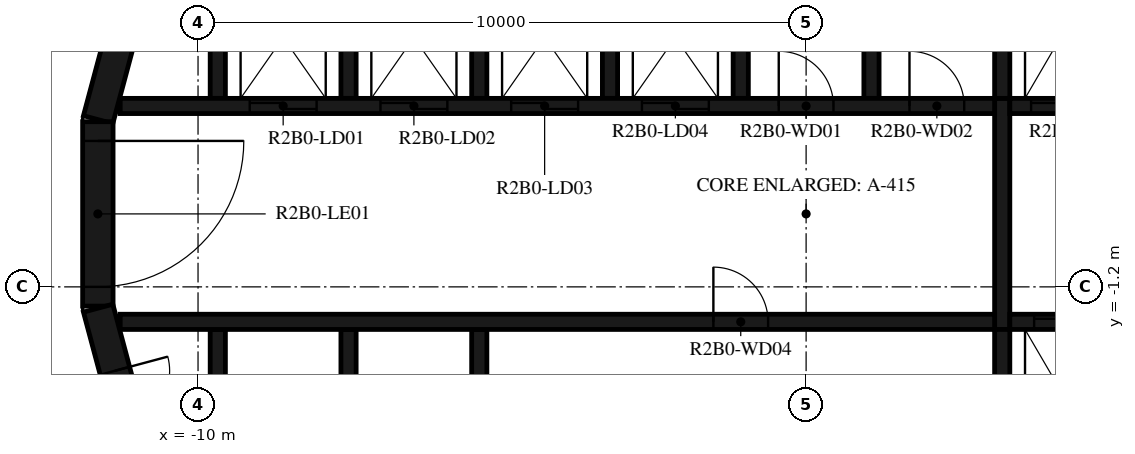
"""IFC4 building model, lengths in metres.
Left out: names, types, materials, properties, quantities, classifications, styles, units other than length and angle.
Written with IfcOpenShell. Run it as: python <this file> out.ifc"""

import sys

from ifc_helpers import new_model, si_unit, direction, frame, frame_2d, origin, place, context, subcontext, project, spatial, polyline, rectangle, outline, extrude, element, fill, save


model = new_model("IFC4")
c1 = context("Model", 3, precision=1e-05, world=origin(), true_north=direction((0.0, 1.0)))
c2 = subcontext(c1, "Body", "Model", "MODEL_VIEW")
j1 = project(units=[si_unit("LENGTHUNIT", "METRE"), si_unit("PLANEANGLEUNIT", "RADIAN")], contexts=[c1])
p1 = place(None, origin())
s1 = spatial("IfcSite", under=j1, at=p1, CompositionType="ELEMENT")
p2 = place(p1, origin())
s2 = spatial("IfcBuilding", under=s1, at=p2, CompositionType="ELEMENT")
p3 = place(p2, frame((0.0, 0.0, 90.7)))
s3 = spatial("IfcBuildingStorey", under=s2, at=p3, CompositionType="ELEMENT", Elevation=90.7)
p4 = place(p3, frame((-10.858, 4.479, 0.0), z_axis=(0.0, 0.0, 1.0), x_axis=(-0.258734743916, -0.965948410781, 0.0)))
e1 = element("IfcWall", 1, at=p4, inside=s3, PredefinedType="SHEAR", context=c2, shape_type="SweptSolid", body=[
    extrude(rectangle(XDim=3.033, YDim=0.5, at=frame_2d((1.516, 0.0))), origin(), (0.0, 0.0, 1.0), 3.12),
])
p5 = place(p3, frame((-11.647, 1.516, 0.0), z_axis=(0.0, 0.0, 1.0), x_axis=(0.0, -1.0, 0.0)))
e2 = element("IfcWall", 2, at=p5, inside=s3, PredefinedType="SHEAR", context=c2, shape_type="SweptSolid", body=[
    extrude(rectangle(XDim=3.033, YDim=0.5, at=frame_2d((1.516, 0.0))), origin(), (0.0, 0.0, 1.0), 3.12),
])
p6 = place(p5, frame((0.316, 0.0, 0.0)))
e3 = element("IfcOpeningElement", 3, at=p6, cuts=e2, PredefinedType="OPENING", context=c2, shape_type="SweptSolid", body=[
    extrude(rectangle(XDim=2.4, YDim=2.1, at=frame_2d((1.2, 1.05))), frame((0.0, 0.26, 0.0), z_axis=(0.0, -1.0, 0.0), x_axis=(1.0, 0.0, 0.0)), (0.0, 0.0, 1.0), 0.52),
])
p7 = place(p3, frame((-11.643, -1.55, 0.0), z_axis=(0.0, 0.0, 1.0), x_axis=(0.258734743916, -0.965948410781, 0.0)))
e4 = element("IfcWall", 4, at=p7, inside=s3, PredefinedType="SHEAR", context=c2, shape_type="SweptSolid", body=[
    extrude(rectangle(XDim=3.033, YDim=0.5, at=frame_2d((1.516, 0.0))), origin(), (0.0, 0.0, 1.0), 3.12),
])
p8 = place(p7, frame((1.066, 0.0, 0.0)))
e5 = element("IfcOpeningElement", 5, at=p8, cuts=e4, PredefinedType="OPENING", context=c2, shape_type="SweptSolid", body=[
    extrude(rectangle(XDim=0.9, YDim=2.1, at=frame_2d((0.45, 1.05))), frame((0.0, 0.26, 0.0), z_axis=(0.0, -1.0, 0.0), x_axis=(1.0, 0.0, 0.0)), (0.0, 0.0, 1.0), 0.52),
])
p9 = place(p3, origin())
e6 = element("IfcWall", 6, at=p9, inside=s3, PredefinedType="SHEAR", context=c2, shape_type="SweptSolid", body=[
    extrude(outline(polyline([(-9.55, 4.8), (-7.65, 4.8), (-7.65, 1.9), (-7.4, 1.9), (-7.4, 4.8), (-5.5, 4.8), (-5.5, 1.9), (-5.25, 1.9), (-5.25, 4.8), (-3.35, 4.8), (-3.35, 1.9), (-3.1, 1.9), (-3.1, 4.8), (-1.2, 4.8), (-1.2, 1.9), (-0.95, 1.9), (-0.95, 4.8), (0.95, 4.8), (0.95, 1.9), (1.2, 1.9), (1.2, 4.8), (3.1, 4.8), (3.1, 1.9), (3.35, 1.9), (3.35, 4.8), (5.25, 4.8), (5.25, 1.9), (5.5, 1.9), (5.5, 4.8), (7.4, 4.8), (7.4, 1.9), (7.65, 1.9), (7.65, 4.8), (9.55, 4.8), (9.55, 1.9), (9.8, 1.9), (9.8, 4.8), (9.8, 5.05), (-9.8, 5.05), (-9.8, 4.8), (-9.8, 1.9), (-9.55, 1.9), (-9.55, 4.8)])), origin(), (0.0, 0.0, 1.0), 3.12),
])
p10 = place(p3, origin())
e7 = element("IfcWall", 7, at=p10, inside=s3, PredefinedType="SHEAR", context=c2, shape_type="SweptSolid", body=[
    extrude(outline(polyline([(9.8, -5.05), (9.8, -4.8), (9.8, -1.9), (9.55, -1.9), (9.55, -4.8), (7.65, -4.8), (7.65, -1.9), (7.4, -1.9), (7.4, -4.8), (5.5, -4.8), (5.5, -1.9), (5.25, -1.9), (5.25, -4.8), (3.35, -4.8), (3.35, -1.9), (3.1, -1.9), (3.1, -4.8), (-5.25, -4.8), (-5.25, -1.9), (-5.5, -1.9), (-5.5, -4.8), (-7.4, -4.8), (-7.4, -1.9), (-7.65, -1.9), (-7.65, -4.8), (-9.55, -4.8), (-9.55, -1.9), (-9.8, -1.9), (-9.8, -4.8), (-9.8, -5.05), (9.8, -5.05)])), origin(), (0.0, 0.0, 1.0), 3.12),
])
p11 = place(p3, frame((-11.28, 1.775, 0.0), z_axis=(0.0, 0.0, 1.0), x_axis=(1.0, 0.0, 0.0)))
e8 = element("IfcWall", 8, at=p11, inside=s3, PredefinedType="SHEAR", context=c2, shape_type="SweptSolid", body=[
    extrude(rectangle(XDim=14.38, YDim=0.25, at=frame_2d((7.19, 0.0))), origin(), (0.0, 0.0, 1.0), 3.12),
])
p12 = place(p11, frame((2.13, 0.0, 0.0)))
e9 = element("IfcOpeningElement", 9, at=p12, cuts=e8, PredefinedType="OPENING", context=c2, shape_type="SweptSolid", body=[
    extrude(rectangle(XDim=1.1, YDim=2.1, at=frame_2d((0.55, 1.05))), frame((0.0, 0.135, 0.0), z_axis=(0.0, -1.0, 0.0), x_axis=(1.0, 0.0, 0.0)), (0.0, 0.0, 1.0), 0.27),
])
p13 = place(p11, frame((4.28, 0.0, 0.0)))
e10 = element("IfcOpeningElement", 10, at=p13, cuts=e8, PredefinedType="OPENING", context=c2, shape_type="SweptSolid", body=[
    extrude(rectangle(XDim=1.1, YDim=2.1, at=frame_2d((0.55, 1.05))), frame((0.0, 0.135, 0.0), z_axis=(0.0, -1.0, 0.0), x_axis=(1.0, 0.0, 0.0)), (0.0, 0.0, 1.0), 0.27),
])
p14 = place(p11, frame((6.43, 0.0, 0.0)))
e11 = element("IfcOpeningElement", 11, at=p14, cuts=e8, PredefinedType="OPENING", context=c2, shape_type="SweptSolid", body=[
    extrude(rectangle(XDim=1.1, YDim=2.1, at=frame_2d((0.55, 1.05))), frame((0.0, 0.135, 0.0), z_axis=(0.0, -1.0, 0.0), x_axis=(1.0, 0.0, 0.0)), (0.0, 0.0, 1.0), 0.27),
])
p15 = place(p11, frame((8.58, 0.0, 0.0)))
e12 = element("IfcOpeningElement", 12, at=p15, cuts=e8, PredefinedType="OPENING", context=c2, shape_type="SweptSolid", body=[
    extrude(rectangle(XDim=1.1, YDim=2.1, at=frame_2d((0.55, 1.05))), frame((0.0, 0.135, 0.0), z_axis=(0.0, -1.0, 0.0), x_axis=(1.0, 0.0, 0.0)), (0.0, 0.0, 1.0), 0.27),
])
p16 = place(p11, frame((10.83, 0.0, 0.0)))
e13 = element("IfcOpeningElement", 13, at=p16, cuts=e8, PredefinedType="OPENING", context=c2, shape_type="SweptSolid", body=[
    extrude(rectangle(XDim=0.9, YDim=2.1, at=frame_2d((0.45, 1.05))), frame((0.0, 0.135, 0.0), z_axis=(0.0, -1.0, 0.0), x_axis=(1.0, 0.0, 0.0)), (0.0, 0.0, 1.0), 0.27),
])
p17 = place(p11, frame((12.98, 0.0, 0.0)))
e14 = element("IfcOpeningElement", 14, at=p17, cuts=e8, PredefinedType="OPENING", context=c2, shape_type="SweptSolid", body=[
    extrude(rectangle(XDim=0.9, YDim=2.1, at=frame_2d((0.45, 1.05))), frame((0.0, 0.135, 0.0), z_axis=(0.0, -1.0, 0.0), x_axis=(1.0, 0.0, 0.0)), (0.0, 0.0, 1.0), 0.27),
])
p18 = place(p3, frame((3.35, 1.775, 0.0), z_axis=(0.0, 0.0, 1.0), x_axis=(1.0, 0.0, 0.0)))
e15 = element("IfcWall", 15, at=p18, inside=s3, PredefinedType="SHEAR", context=c2, shape_type="SweptSolid", body=[
    extrude(rectangle(XDim=7.93, YDim=0.25, at=frame_2d((3.965, 0.0))), origin(), (0.0, 0.0, 1.0), 3.12),
])
p19 = place(p18, frame((0.35, 0.0, 0.0)))
e16 = element("IfcOpeningElement", 16, at=p19, cuts=e15, PredefinedType="OPENING", context=c2, shape_type="SweptSolid", body=[
    extrude(rectangle(XDim=1.2, YDim=2.4, at=frame_2d((0.6, 1.2))), frame((0.0, 0.135, 0.0), z_axis=(0.0, -1.0, 0.0), x_axis=(1.0, 0.0, 0.0)), (0.0, 0.0, 1.0), 0.27),
])
p20 = place(p18, frame((2.5, 0.0, 0.0)))
e17 = element("IfcOpeningElement", 17, at=p20, cuts=e15, PredefinedType="OPENING", context=c2, shape_type="SweptSolid", body=[
    extrude(rectangle(XDim=1.2, YDim=2.4, at=frame_2d((0.6, 1.2))), frame((0.0, 0.135, 0.0), z_axis=(0.0, -1.0, 0.0), x_axis=(1.0, 0.0, 0.0)), (0.0, 0.0, 1.0), 0.27),
])
p21 = place(p18, frame((4.8, 0.0, 0.0)))
e18 = element("IfcOpeningElement", 18, at=p21, cuts=e15, PredefinedType="OPENING", context=c2, shape_type="SweptSolid", body=[
    extrude(rectangle(XDim=0.9, YDim=2.1, at=frame_2d((0.45, 1.05))), frame((0.0, 0.135, 0.0), z_axis=(0.0, -1.0, 0.0), x_axis=(1.0, 0.0, 0.0)), (0.0, 0.0, 1.0), 0.27),
])
p22 = place(p3, frame((-11.28, -1.775, 0.0), z_axis=(0.0, 0.0, 1.0), x_axis=(1.0, 0.0, 0.0)))
e19 = element("IfcWall", 19, at=p22, inside=s3, PredefinedType="SHEAR", context=c2, shape_type="SweptSolid", body=[
    extrude(rectangle(XDim=14.38, YDim=0.25, at=frame_2d((7.19, 0.0))), origin(), (0.0, 0.0, 1.0), 3.12),
])
p23 = place(p22, frame((9.755, 0.0, 0.0)))
e20 = element("IfcOpeningElement", 20, at=p23, cuts=e19, PredefinedType="OPENING", context=c2, shape_type="SweptSolid", body=[
    extrude(rectangle(XDim=0.9, YDim=2.1, at=frame_2d((0.45, 1.05))), frame((0.0, 0.135, 0.0), z_axis=(0.0, -1.0, 0.0), x_axis=(1.0, 0.0, 0.0)), (0.0, 0.0, 1.0), 0.27),
])
p24 = place(p3, frame((3.35, -1.775, 0.0), z_axis=(0.0, 0.0, 1.0), x_axis=(1.0, 0.0, 0.0)))
e21 = element("IfcWall", 21, at=p24, inside=s3, PredefinedType="SHEAR", context=c2, shape_type="SweptSolid", body=[
    extrude(rectangle(XDim=7.93, YDim=0.25, at=frame_2d((3.965, 0.0))), origin(), (0.0, 0.0, 1.0), 3.12),
])
p25 = place(p24, frame((0.4, 0.0, 0.0)))
e22 = element("IfcOpeningElement", 22, at=p25, cuts=e21, PredefinedType="OPENING", context=c2, shape_type="SweptSolid", body=[
    extrude(rectangle(XDim=1.1, YDim=2.4, at=frame_2d((0.55, 1.2))), frame((0.0, 0.135, 0.0), z_axis=(0.0, -1.0, 0.0), x_axis=(1.0, 0.0, 0.0)), (0.0, 0.0, 1.0), 0.27),
])
p26 = place(p24, frame((2.55, 0.0, 0.0)))
e23 = element("IfcOpeningElement", 23, at=p26, cuts=e21, PredefinedType="OPENING", context=c2, shape_type="SweptSolid", body=[
    extrude(rectangle(XDim=1.1, YDim=2.4, at=frame_2d((0.55, 1.2))), frame((0.0, 0.135, 0.0), z_axis=(0.0, -1.0, 0.0), x_axis=(1.0, 0.0, 0.0)), (0.0, 0.0, 1.0), 0.27),
])
p27 = place(p24, frame((4.7, 0.0, 0.0)))
e24 = element("IfcOpeningElement", 24, at=p27, cuts=e21, PredefinedType="OPENING", context=c2, shape_type="SweptSolid", body=[
    extrude(rectangle(XDim=1.1, YDim=2.4, at=frame_2d((0.55, 1.2))), frame((0.0, 0.135, 0.0), z_axis=(0.0, -1.0, 0.0), x_axis=(1.0, 0.0, 0.0)), (0.0, 0.0, 1.0), 0.27),
])
p28 = place(p3, frame((3.225, -1.9, 0.0), z_axis=(0.0, 0.0, 1.0), x_axis=(0.0, 1.0, 0.0)))
e25 = element("IfcWall", 25, at=p28, inside=s3, PredefinedType="SHEAR", context=c2, shape_type="SweptSolid", body=[
    extrude(rectangle(XDim=3.8, YDim=0.25, at=frame_2d((1.9, 0.0))), origin(), (0.0, 0.0, 1.0), 3.12),
])
p29 = place(p3, frame((-11.1, 8.829, 0.0), z_axis=(0.0, 0.0, 1.0), x_axis=(-0.398741918631, -0.917063183388, 0.0)))
e26 = element("IfcWall", 26, at=p29, inside=s3, PredefinedType="STANDARD", context=c2, shape_type="SweptSolid", body=[
    extrude(rectangle(XDim=7.342, YDim=0.2, at=frame_2d((3.671, 0.0))), origin(), (0.0, 0.0, 1.0), 3.12),
])
p30 = place(p29, frame((0.2, 0.0, 0.0)))
e27 = element("IfcOpeningElement", 27, at=p30, cuts=e26, PredefinedType="OPENING", context=c2, shape_type="SweptSolid", body=[
    extrude(rectangle(XDim=1.0, YDim=2.1, at=frame_2d((0.5, 1.05))), frame((0.0, 0.11, 0.0), z_axis=(0.0, -1.0, 0.0), x_axis=(1.0, 0.0, 0.0)), (0.0, 0.0, 1.0), 0.22),
])
p31 = place(p6, origin())
e28 = element("IfcDoor", 28, at=p31, inside=s3, OperationType="DOUBLE_DOOR_SINGLE_SWING", PredefinedType="DOOR", context=c2, shape_type="SweptSolid", body=[
    extrude(rectangle(XDim=2.4, YDim=2.1, at=frame_2d((1.2, 1.05))), frame((0.0, 0.025, 0.0), z_axis=(0.0, -1.0, 0.0), x_axis=(1.0, 0.0, 0.0)), (0.0, 0.0, 1.0), 0.05),
])
fill(e3, e28)
p32 = place(p12, origin())
e29 = element("IfcDoor", 29, at=p32, inside=s3, OperationType="DOUBLE_DOOR_SLIDING", PredefinedType="DOOR", context=c2, shape_type="SweptSolid", body=[
    extrude(rectangle(XDim=1.1, YDim=2.1, at=frame_2d((0.55, 1.05))), frame((0.0, 0.025, 0.0), z_axis=(0.0, -1.0, 0.0), x_axis=(1.0, 0.0, 0.0)), (0.0, 0.0, 1.0), 0.05),
])
fill(e9, e29)
p33 = place(p13, origin())
e30 = element("IfcDoor", 30, at=p33, inside=s3, OperationType="DOUBLE_DOOR_SLIDING", PredefinedType="DOOR", context=c2, shape_type="SweptSolid", body=[
    extrude(rectangle(XDim=1.1, YDim=2.1, at=frame_2d((0.55, 1.05))), frame((0.0, 0.025, 0.0), z_axis=(0.0, -1.0, 0.0), x_axis=(1.0, 0.0, 0.0)), (0.0, 0.0, 1.0), 0.05),
])
fill(e10, e30)
p34 = place(p14, origin())
e31 = element("IfcDoor", 31, at=p34, inside=s3, OperationType="DOUBLE_DOOR_SLIDING", PredefinedType="DOOR", context=c2, shape_type="SweptSolid", body=[
    extrude(rectangle(XDim=1.1, YDim=2.1, at=frame_2d((0.55, 1.05))), frame((0.0, 0.025, 0.0), z_axis=(0.0, -1.0, 0.0), x_axis=(1.0, 0.0, 0.0)), (0.0, 0.0, 1.0), 0.05),
])
fill(e11, e31)
p35 = place(p15, origin())
e32 = element("IfcDoor", 32, at=p35, inside=s3, OperationType="DOUBLE_DOOR_SLIDING", PredefinedType="DOOR", context=c2, shape_type="SweptSolid", body=[
    extrude(rectangle(XDim=1.1, YDim=2.1, at=frame_2d((0.55, 1.05))), frame((0.0, 0.025, 0.0), z_axis=(0.0, -1.0, 0.0), x_axis=(1.0, 0.0, 0.0)), (0.0, 0.0, 1.0), 0.05),
])
fill(e12, e32)
p36 = place(p19, origin())
e33 = element("IfcDoor", 33, at=p36, inside=s3, OperationType="DOUBLE_DOOR_SLIDING", PredefinedType="DOOR", context=c2, shape_type="SweptSolid", body=[
    extrude(rectangle(XDim=1.2, YDim=2.4, at=frame_2d((0.6, 1.2))), frame((0.0, 0.025, 0.0), z_axis=(0.0, -1.0, 0.0), x_axis=(1.0, 0.0, 0.0)), (0.0, 0.0, 1.0), 0.05),
])
fill(e16, e33)
p37 = place(p25, origin())
e34 = element("IfcDoor", 34, at=p37, inside=s3, OperationType="DOUBLE_DOOR_SLIDING", PredefinedType="DOOR", context=c2, shape_type="SweptSolid", body=[
    extrude(rectangle(XDim=1.1, YDim=2.4, at=frame_2d((0.55, 1.2))), frame((0.0, 0.025, 0.0), z_axis=(0.0, -1.0, 0.0), x_axis=(1.0, 0.0, 0.0)), (0.0, 0.0, 1.0), 0.05),
])
fill(e22, e34)
p38 = place(p16, origin())
e35 = element("IfcDoor", 35, at=p38, inside=s3, OperationType="SINGLE_SWING_RIGHT", PredefinedType="DOOR", context=c2, shape_type="SweptSolid", body=[
    extrude(rectangle(XDim=0.9, YDim=2.1, at=frame_2d((0.45, 1.05))), frame((0.0, 0.025, 0.0), z_axis=(0.0, -1.0, 0.0), x_axis=(1.0, 0.0, 0.0)), (0.0, 0.0, 1.0), 0.05),
])
fill(e13, e35)
p39 = place(p17, origin())
e36 = element("IfcDoor", 36, at=p39, inside=s3, OperationType="SINGLE_SWING_LEFT", PredefinedType="DOOR", context=c2, shape_type="SweptSolid", body=[
    extrude(rectangle(XDim=0.9, YDim=2.1, at=frame_2d((0.45, 1.05))), frame((0.0, 0.025, 0.0), z_axis=(0.0, -1.0, 0.0), x_axis=(1.0, 0.0, 0.0)), (0.0, 0.0, 1.0), 0.05),
])
fill(e14, e36)
p40 = place(p23, origin())
e37 = element("IfcDoor", 37, at=p40, inside=s3, OperationType="SINGLE_SWING_LEFT", PredefinedType="DOOR", context=c2, shape_type="SweptSolid", body=[
    extrude(rectangle(XDim=0.9, YDim=2.1, at=frame_2d((0.45, 1.05))), frame((0.0, 0.025, 0.0), z_axis=(0.0, -1.0, 0.0), x_axis=(1.0, 0.0, 0.0)), (0.0, 0.0, 1.0), 0.05),
])
fill(e20, e37)
p41 = place(p8, origin())
e38 = element("IfcDoor", 38, at=p41, inside=s3, OperationType="SINGLE_SWING_RIGHT", PredefinedType="DOOR", context=c2, shape_type="SweptSolid", body=[
    extrude(rectangle(XDim=0.9, YDim=2.1, at=frame_2d((0.45, 1.05))), frame((0.0, 0.025, 0.0), z_axis=(0.0, -1.0, 0.0), x_axis=(1.0, 0.0, 0.0)), (0.0, 0.0, 1.0), 0.05),
])
fill(e5, e38)
save(model, sys.argv[1])
